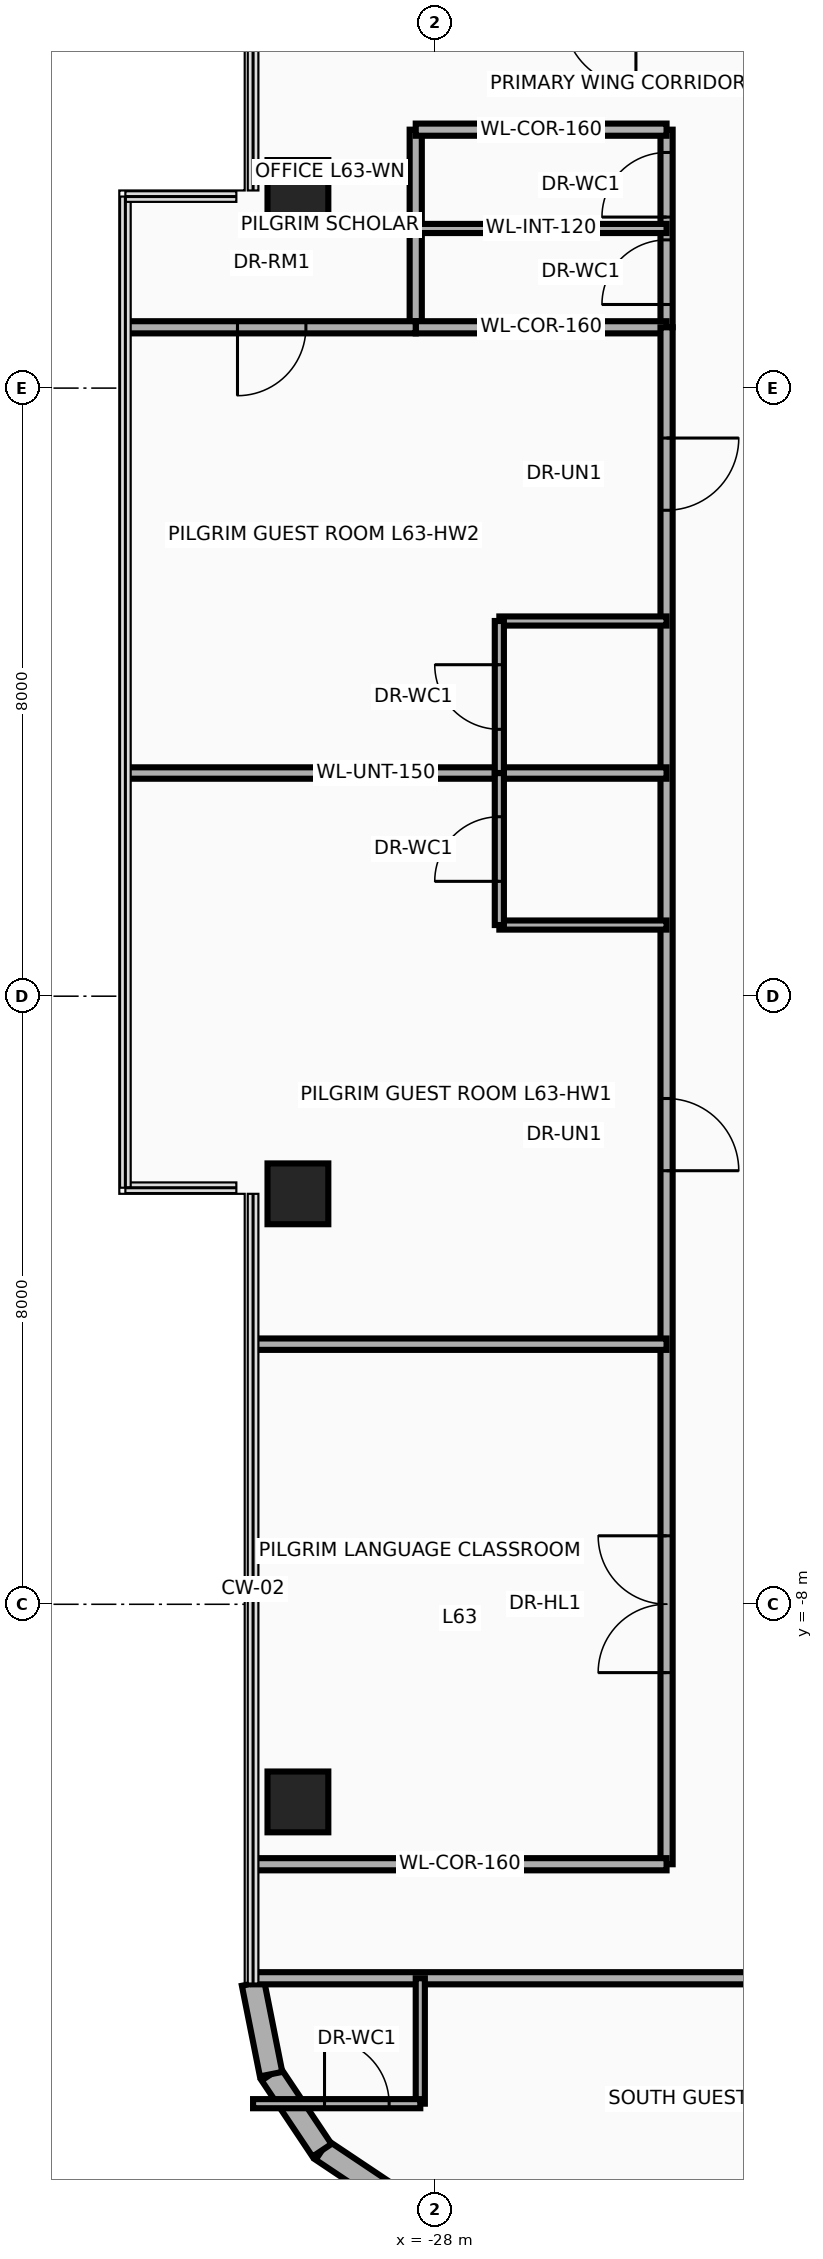
"""IFC4 building model, lengths in metres.
Left out: names, types, materials, properties, quantities, classifications, styles, units other than length and angle.
Written with IfcOpenShell. Run it as: python <this file> out.ifc"""

import sys

from ifc_helpers import new_model, si_unit, direction, frame, frame_2d, origin, origin_2d, place, context, subcontext, project, spatial, rectangle, extrude, source, transform, mapped, element, fill, save


model = new_model("IFC4")
c1 = context("Model", 3, precision=1e-05, world=origin(), true_north=direction((0.0, 1.0)))
c2 = subcontext(c1, "Body", "Model", "MODEL_VIEW")
j1 = project(units=[si_unit("LENGTHUNIT", "METRE"), si_unit("PLANEANGLEUNIT", "RADIAN")], contexts=[c1])
p1 = place(None, origin())
s1 = spatial("IfcSite", under=j1, at=p1, CompositionType="ELEMENT")
p2 = place(p1, origin())
s2 = spatial("IfcBuilding", under=s1, at=p2, CompositionType="ELEMENT")
p3 = place(p2, frame((0.0, 0.0, 244.0)))
s3 = spatial("IfcBuildingStorey", under=s2, at=p3, CompositionType="ELEMENT", Elevation=244.0)
m1 = source(origin(), c2, "Body", "SweptSolid", [
    extrude(rectangle(XDim=0.8, YDim=0.8, at=origin_2d()), origin(), (0.0, 0.0, 1.0), 3.5),
])
for number, where, z_axis, x_axis in (
    (1, (-29.8, -10.6, 0.0), (0.0, 0.0, 1.0), (1.0, 0.0, 0.0)),
    (2, (-29.8, -2.6, 0.0), (0.0, 0.0, 1.0), (1.0, 0.0, 0.0)),
    (3, (-29.8, 10.6, 0.0), (0.0, 0.0, 1.0), (1.0, 0.0, 0.0)),
):
    element("IfcColumn", number, at=place(p3, frame(where, z_axis=z_axis, x_axis=x_axis)), inside=s3, PredefinedType="COLUMN", context=c2, shape_type="MappedRepresentation", body=[
        mapped(m1, transform((0.0, 0.0, 0.0), x_axis=(1.0, 0.0, 0.0), y_axis=(0.0, 1.0, 0.0), z_axis=(0.0, 0.0, 1.0), scale=1.0)),
    ])
for number, where, z_axis, x_axis in (
    (4, (-28.482, -15.853, 0.0), (0.0, 0.0, 1.0), (-0.831, 0.556, 0.0)),
    (5, (-29.483, -15.183, 0.0), (0.0, 0.0, 1.0), (-0.556, 0.831, 0.0)),
):
    element("IfcWall", number, at=place(p3, frame(where, z_axis=z_axis, x_axis=x_axis)), inside=s3, PredefinedType="SOLIDWALL", context=c2, shape_type="SweptSolid", body=[
        extrude(rectangle(XDim=1.205, YDim=0.3, at=frame_2d((0.603, 0.0))), origin(), (0.0, 0.0, 1.0), 3.26),
    ])
p4 = place(p3, frame((-30.153, -14.182, 0.0), z_axis=(0.0, 0.0, 1.0), x_axis=(-0.194996050505, 0.980804027463, 0.0)))
e6 = element("IfcWall", 6, at=p4, inside=s3, PredefinedType="SOLIDWALL", context=c2, shape_type="SweptSolid", body=[
    extrude(rectangle(XDim=1.216, YDim=0.3, at=frame_2d((0.608, 0.0))), origin(), (0.0, 0.0, 1.0), 3.26),
])
p5 = place(p3, frame((-28.25, 8.8, 0.0), z_axis=(0.0, 0.0, 1.0), x_axis=(0.0, 1.0, 0.0)))
e7 = element("IfcWall", 7, at=p5, inside=s3, PredefinedType="PARTITIONING", context=c2, shape_type="SweptSolid", body=[
    extrude(rectangle(XDim=2.6, YDim=0.16, at=frame_2d((1.3, 0.0))), origin(), (0.0, 0.0, 1.0), 2.544),
])
p6 = place(p3, frame((-24.95, 8.8, 0.0), z_axis=(0.0, 0.0, 1.0), x_axis=(0.0, 1.0, 0.0)))
e8 = element("IfcWall", 8, at=p6, inside=s3, PredefinedType="PARTITIONING", context=c2, shape_type="SweptSolid", body=[
    extrude(rectangle(XDim=2.6, YDim=0.16, at=frame_2d((1.3, 0.0))), origin(), (0.0, 0.0, 1.0), 2.544),
])
p7 = place(p6, frame((0.3, 0.0, 0.0)))
e9 = element("IfcOpeningElement", 9, at=p7, cuts=e8, PredefinedType="OPENING", context=c2, shape_type="SweptSolid", body=[
    extrude(rectangle(XDim=0.85, YDim=2.1, at=frame_2d((0.425, 1.05))), frame((0.0, 0.095, 0.0), z_axis=(0.0, -1.0, 0.0), x_axis=(1.0, 0.0, 0.0)), (0.0, 0.0, 1.0), 0.19),
])
p8 = place(p6, frame((1.45, 0.0, 0.0)))
e10 = element("IfcOpeningElement", 10, at=p8, cuts=e8, PredefinedType="OPENING", context=c2, shape_type="SweptSolid", body=[
    extrude(rectangle(XDim=0.85, YDim=2.1, at=frame_2d((0.425, 1.05))), frame((0.0, 0.095, 0.0), z_axis=(0.0, -1.0, 0.0), x_axis=(1.0, 0.0, 0.0)), (0.0, 0.0, 1.0), 0.19),
])
for number, where, z_axis, x_axis in (
    (11, (-28.25, 8.8, 0.0), (0.0, 0.0, 1.0), (1.0, 0.0, 0.0)),
    (12, (-28.25, 11.4, 0.0), (0.0, 0.0, 1.0), (1.0, 0.0, 0.0)),
):
    element("IfcWall", number, at=place(p3, frame(where, z_axis=z_axis, x_axis=x_axis)), inside=s3, PredefinedType="PARTITIONING", context=c2, shape_type="SweptSolid", body=[
        extrude(rectangle(XDim=3.3, YDim=0.16, at=frame_2d((1.65, 0.0))), origin(), (0.0, 0.0, 1.0), 3.26),
    ])
p9 = place(p3, frame((-28.25, 10.1, 0.0), z_axis=(0.0, 0.0, 1.0), x_axis=(1.0, 0.0, 0.0)))
e13 = element("IfcWall", 13, at=p9, inside=s3, PredefinedType="PARTITIONING", context=c2, shape_type="SweptSolid", body=[
    extrude(rectangle(XDim=3.3, YDim=0.12, at=frame_2d((1.65, 0.0))), origin(), (0.0, 0.0, 1.0), 3.26),
])
p10 = place(p3, frame((-24.95, -11.42, 0.0), z_axis=(0.0, 0.0, 1.0), x_axis=(0.0, 1.0, 0.0)))
e14 = element("IfcWall", 14, at=p10, inside=s3, PredefinedType="PARTITIONING", context=c2, shape_type="SweptSolid", body=[
    extrude(rectangle(XDim=20.22, YDim=0.16, at=frame_2d((10.11, 0.0))), origin(), (0.0, 0.0, 1.0), 2.544),
])
p11 = place(p10, frame((2.521, 0.0, 0.0)))
e15 = element("IfcOpeningElement", 15, at=p11, cuts=e14, PredefinedType="OPENING", context=c2, shape_type="SweptSolid", body=[
    extrude(rectangle(XDim=1.8, YDim=2.15, at=frame_2d((0.9, 1.075))), frame((0.0, 0.095, 0.0), z_axis=(0.0, -1.0, 0.0), x_axis=(1.0, 0.0, 0.0)), (0.0, 0.0, 1.0), 0.19),
])
p12 = place(p10, frame((9.124, 0.0, 0.0)))
e16 = element("IfcOpeningElement", 16, at=p12, cuts=e14, PredefinedType="OPENING", context=c2, shape_type="SweptSolid", body=[
    extrude(rectangle(XDim=0.95, YDim=2.15, at=frame_2d((0.475, 1.075))), frame((0.0, 0.095, 0.0), z_axis=(0.0, -1.0, 0.0), x_axis=(1.0, 0.0, 0.0)), (0.0, 0.0, 1.0), 0.19),
])
p13 = place(p10, frame((17.813, 0.0, 0.0)))
e17 = element("IfcOpeningElement", 17, at=p13, cuts=e14, PredefinedType="OPENING", context=c2, shape_type="SweptSolid", body=[
    extrude(rectangle(XDim=0.95, YDim=2.15, at=frame_2d((0.475, 1.075))), frame((0.0, 0.095, 0.0), z_axis=(0.0, -1.0, 0.0), x_axis=(1.0, 0.0, 0.0)), (0.0, 0.0, 1.0), 0.19),
])
p14 = place(p3, frame((-32.04, 8.8, 0.0), z_axis=(0.0, 0.0, 1.0), x_axis=(1.0, 0.0, 0.0)))
e18 = element("IfcWall", 18, at=p14, inside=s3, PredefinedType="PARTITIONING", context=c2, shape_type="SweptSolid", body=[
    extrude(rectangle(XDim=3.79, YDim=0.16, at=frame_2d((1.895, 0.0))), origin(), (0.0, 0.0, 1.0), 2.706),
])
p15 = place(p14, frame((1.445, 0.0, 0.0)))
e19 = element("IfcOpeningElement", 19, at=p15, cuts=e18, PredefinedType="OPENING", context=c2, shape_type="SweptSolid", body=[
    extrude(rectangle(XDim=0.9, YDim=2.1, at=frame_2d((0.45, 1.05))), frame((0.0, 0.095, 0.0), z_axis=(0.0, -1.0, 0.0), x_axis=(1.0, 0.0, 0.0)), (0.0, 0.0, 1.0), 0.19),
])
p16 = place(p3, frame((-30.39, -4.578, 0.0), z_axis=(0.0, 0.0, 1.0), x_axis=(1.0, 0.0, 0.0)))
e20 = element("IfcWall", 20, at=p16, inside=s3, PredefinedType="PARTITIONING", context=c2, shape_type="SweptSolid", body=[
    extrude(rectangle(XDim=5.44, YDim=0.15, at=frame_2d((2.72, 0.0))), origin(), (0.0, 0.0, 1.0), 2.706),
])
p17 = place(p3, frame((-32.04, 2.936, 0.0), z_axis=(0.0, 0.0, 1.0), x_axis=(1.0, 0.0, 0.0)))
e21 = element("IfcWall", 21, at=p17, inside=s3, PredefinedType="PARTITIONING", context=c2, shape_type="SweptSolid", body=[
    extrude(rectangle(XDim=7.09, YDim=0.15, at=frame_2d((3.545, 0.0))), origin(), (0.0, 0.0, 1.0), 2.706),
])
p18 = place(p3, frame((-27.15, 0.936, 0.0), z_axis=(0.0, 0.0, 1.0), x_axis=(1.0, 0.0, 0.0)))
e22 = element("IfcWall", 22, at=p18, inside=s3, PredefinedType="PARTITIONING", context=c2, shape_type="SweptSolid", body=[
    extrude(rectangle(XDim=2.2, YDim=0.12, at=frame_2d((1.1, 0.0))), origin(), (0.0, 0.0, 1.0), 2.839),
])
p19 = place(p3, frame((-27.15, 0.936, 0.0), z_axis=(0.0, 0.0, 1.0), x_axis=(0.0, 1.0, 0.0)))
e23 = element("IfcWall", 23, at=p19, inside=s3, PredefinedType="PARTITIONING", context=c2, shape_type="SweptSolid", body=[
    extrude(rectangle(XDim=2.0, YDim=0.12, at=frame_2d((1.0, 0.0))), origin(), (0.0, 0.0, 1.0), 2.839),
])
p20 = place(p19, frame((0.575, 0.0, 0.0)))
e24 = element("IfcOpeningElement", 24, at=p20, cuts=e23, PredefinedType="OPENING", context=c2, shape_type="SweptSolid", body=[
    extrude(rectangle(XDim=0.85, YDim=2.1, at=frame_2d((0.425, 1.05))), frame((0.0, 0.075, 0.0), z_axis=(0.0, -1.0, 0.0), x_axis=(1.0, 0.0, 0.0)), (0.0, 0.0, 1.0), 0.15),
])
p21 = place(p3, frame((-27.15, 4.936, 0.0), z_axis=(0.0, 0.0, 1.0), x_axis=(1.0, 0.0, 0.0)))
e25 = element("IfcWall", 25, at=p21, inside=s3, PredefinedType="PARTITIONING", context=c2, shape_type="SweptSolid", body=[
    extrude(rectangle(XDim=2.2, YDim=0.12, at=frame_2d((1.1, 0.0))), origin(), (0.0, 0.0, 1.0), 3.26),
])
p22 = place(p3, frame((-27.15, 2.936, 0.0), z_axis=(0.0, 0.0, 1.0), x_axis=(0.0, 1.0, 0.0)))
e26 = element("IfcWall", 26, at=p22, inside=s3, PredefinedType="PARTITIONING", context=c2, shape_type="SweptSolid", body=[
    extrude(rectangle(XDim=2.0, YDim=0.12, at=frame_2d((1.0, 0.0))), origin(), (0.0, 0.0, 1.0), 2.839),
])
p23 = place(p22, frame((0.575, 0.0, 0.0)))
e27 = element("IfcOpeningElement", 27, at=p23, cuts=e26, PredefinedType="OPENING", context=c2, shape_type="SweptSolid", body=[
    extrude(rectangle(XDim=0.85, YDim=2.1, at=frame_2d((0.425, 1.05))), frame((0.0, 0.075, 0.0), z_axis=(0.0, -1.0, 0.0), x_axis=(1.0, 0.0, 0.0)), (0.0, 0.0, 1.0), 0.15),
])
p24 = place(p3, frame((-30.39, -12.92, 0.0), z_axis=(0.0, 0.0, 1.0), x_axis=(1.0, 0.0, 0.0)))
e28 = element("IfcWall", 28, at=p24, inside=s3, PredefinedType="PARTITIONING", context=c2, shape_type="SweptSolid", body=[
    extrude(rectangle(XDim=20.78, YDim=0.16, at=frame_2d((10.39, 0.0))), origin(), (0.0, 0.0, 1.0), 2.634),
])
p25 = place(p24, frame((6.5, 0.0, 0.0)))
e29 = element("IfcOpeningElement", 29, at=p25, cuts=e28, PredefinedType="OPENING", context=c2, shape_type="SweptSolid", body=[
    extrude(rectangle(XDim=0.95, YDim=2.15, at=frame_2d((0.475, 1.075))), frame((0.0, 0.095, 0.0), z_axis=(0.0, -1.0, 0.0), x_axis=(1.0, 0.0, 0.0)), (0.0, 0.0, 1.0), 0.19),
])
p26 = place(p24, frame((16.73, 0.0, 0.0)))
e30 = element("IfcOpeningElement", 30, at=p26, cuts=e28, PredefinedType="OPENING", context=c2, shape_type="SweptSolid", body=[
    extrude(rectangle(XDim=0.95, YDim=2.15, at=frame_2d((0.475, 1.075))), frame((0.0, 0.095, 0.0), z_axis=(0.0, -1.0, 0.0), x_axis=(1.0, 0.0, 0.0)), (0.0, 0.0, 1.0), 0.19),
])
p27 = place(p3, frame((-28.19, -14.57, 0.0), z_axis=(0.0, 0.0, 1.0), x_axis=(0.0, 1.0, 0.0)))
e31 = element("IfcWall", 31, at=p27, inside=s3, PredefinedType="PARTITIONING", context=c2, shape_type="SweptSolid", body=[
    extrude(rectangle(XDim=1.65, YDim=0.12, at=frame_2d((0.825, 0.0))), origin(), (0.0, 0.0, 1.0), 3.26),
])
p28 = place(p3, frame((-30.39, -14.57, 0.0), z_axis=(0.0, 0.0, 1.0), x_axis=(1.0, 0.0, 0.0)))
e32 = element("IfcWall", 32, at=p28, inside=s3, PredefinedType="PARTITIONING", context=c2, shape_type="SweptSolid", body=[
    extrude(rectangle(XDim=2.2, YDim=0.12, at=frame_2d((1.1, 0.0))), origin(), (0.0, 0.0, 1.0), 3.26),
])
p29 = place(p28, frame((0.94, 0.0, 0.0)))
e33 = element("IfcOpeningElement", 33, at=p29, cuts=e32, PredefinedType="OPENING", context=c2, shape_type="SweptSolid", body=[
    extrude(rectangle(XDim=0.85, YDim=2.1, at=frame_2d((0.425, 1.05))), frame((0.0, 0.075, 0.0), z_axis=(0.0, -1.0, 0.0), x_axis=(1.0, 0.0, 0.0)), (0.0, 0.0, 1.0), 0.15),
])
p30 = place(p3, frame((-30.39, -11.42, 0.0), z_axis=(0.0, 0.0, 1.0), x_axis=(1.0, 0.0, 0.0)))
e34 = element("IfcWall", 34, at=p30, inside=s3, PredefinedType="PARTITIONING", context=c2, shape_type="SweptSolid", body=[
    extrude(rectangle(XDim=5.44, YDim=0.16, at=frame_2d((2.72, 0.0))), origin(), (0.0, 0.0, 1.0), 3.26),
])
p31 = place(p7, origin())
e35 = element("IfcDoor", 35, at=p31, inside=s3, OperationType="SINGLE_SWING_LEFT", PredefinedType="DOOR", context=c2, shape_type="SweptSolid", body=[
    extrude(rectangle(XDim=0.85, YDim=2.1, at=frame_2d((0.425, 1.05))), frame((0.0, 0.025, 0.0), z_axis=(0.0, -1.0, 0.0), x_axis=(1.0, 0.0, 0.0)), (0.0, 0.0, 1.0), 0.05),
])
fill(e9, e35)
p32 = place(p8, origin())
e36 = element("IfcDoor", 36, at=p32, inside=s3, OperationType="SINGLE_SWING_RIGHT", PredefinedType="DOOR", context=c2, shape_type="SweptSolid", body=[
    extrude(rectangle(XDim=0.85, YDim=2.1, at=frame_2d((0.425, 1.05))), frame((0.0, 0.025, 0.0), z_axis=(0.0, -1.0, 0.0), x_axis=(1.0, 0.0, 0.0)), (0.0, 0.0, 1.0), 0.05),
])
fill(e10, e36)
p33 = place(p15, frame((0.9, 0.0, 0.0), z_axis=(0.0, 0.0, 1.0), x_axis=(-1.0, 0.0, 0.0)))
e37 = element("IfcDoor", 37, at=p33, inside=s3, OperationType="SINGLE_SWING_LEFT", PredefinedType="DOOR", context=c2, shape_type="SweptSolid", body=[
    extrude(rectangle(XDim=0.9, YDim=2.1, at=frame_2d((0.45, 1.05))), frame((0.0, 0.025, 0.0), z_axis=(0.0, -1.0, 0.0), x_axis=(1.0, 0.0, 0.0)), (0.0, 0.0, 1.0), 0.05),
])
fill(e19, e37)
p34 = place(p11, origin())
e38 = element("IfcDoor", 38, at=p34, inside=s3, OperationType="DOUBLE_DOOR_SINGLE_SWING", PredefinedType="DOOR", context=c2, shape_type="SweptSolid", body=[
    extrude(rectangle(XDim=1.8, YDim=2.15, at=frame_2d((0.9, 1.075))), frame((0.0, 0.025, 0.0), z_axis=(0.0, -1.0, 0.0), x_axis=(1.0, 0.0, 0.0)), (0.0, 0.0, 1.0), 0.05),
])
fill(e15, e38)
p35 = place(p12, frame((0.95, 0.0, 0.0), z_axis=(0.0, 0.0, 1.0), x_axis=(-1.0, 0.0, 0.0)))
e39 = element("IfcDoor", 39, at=p35, inside=s3, OperationType="SINGLE_SWING_LEFT", PredefinedType="DOOR", context=c2, shape_type="SweptSolid", body=[
    extrude(rectangle(XDim=0.95, YDim=2.15, at=frame_2d((0.475, 1.075))), frame((0.0, 0.025, 0.0), z_axis=(0.0, -1.0, 0.0), x_axis=(1.0, 0.0, 0.0)), (0.0, 0.0, 1.0), 0.05),
])
fill(e16, e39)
p36 = place(p20, origin())
e40 = element("IfcDoor", 40, at=p36, inside=s3, OperationType="SINGLE_SWING_RIGHT", PredefinedType="DOOR", context=c2, shape_type="SweptSolid", body=[
    extrude(rectangle(XDim=0.85, YDim=2.1, at=frame_2d((0.425, 1.05))), frame((0.0, 0.025, 0.0), z_axis=(0.0, -1.0, 0.0), x_axis=(1.0, 0.0, 0.0)), (0.0, 0.0, 1.0), 0.05),
])
fill(e24, e40)
p37 = place(p13, frame((0.95, 0.0, 0.0), z_axis=(0.0, 0.0, 1.0), x_axis=(-1.0, 0.0, 0.0)))
e41 = element("IfcDoor", 41, at=p37, inside=s3, OperationType="SINGLE_SWING_LEFT", PredefinedType="DOOR", context=c2, shape_type="SweptSolid", body=[
    extrude(rectangle(XDim=0.95, YDim=2.15, at=frame_2d((0.475, 1.075))), frame((0.0, 0.025, 0.0), z_axis=(0.0, -1.0, 0.0), x_axis=(1.0, 0.0, 0.0)), (0.0, 0.0, 1.0), 0.05),
])
fill(e17, e41)
p38 = place(p23, origin())
e42 = element("IfcDoor", 42, at=p38, inside=s3, OperationType="SINGLE_SWING_RIGHT", PredefinedType="DOOR", context=c2, shape_type="SweptSolid", body=[
    extrude(rectangle(XDim=0.85, YDim=2.1, at=frame_2d((0.425, 1.05))), frame((0.0, 0.025, 0.0), z_axis=(0.0, -1.0, 0.0), x_axis=(1.0, 0.0, 0.0)), (0.0, 0.0, 1.0), 0.05),
])
fill(e27, e42)
p39 = place(p29, origin())
e43 = element("IfcDoor", 43, at=p39, inside=s3, OperationType="SINGLE_SWING_RIGHT", PredefinedType="DOOR", context=c2, shape_type="SweptSolid", body=[
    extrude(rectangle(XDim=0.85, YDim=2.1, at=frame_2d((0.425, 1.05))), frame((0.0, 0.025, 0.0), z_axis=(0.0, -1.0, 0.0), x_axis=(1.0, 0.0, 0.0)), (0.0, 0.0, 1.0), 0.05),
])
fill(e33, e43)
save(model, sys.argv[1])
